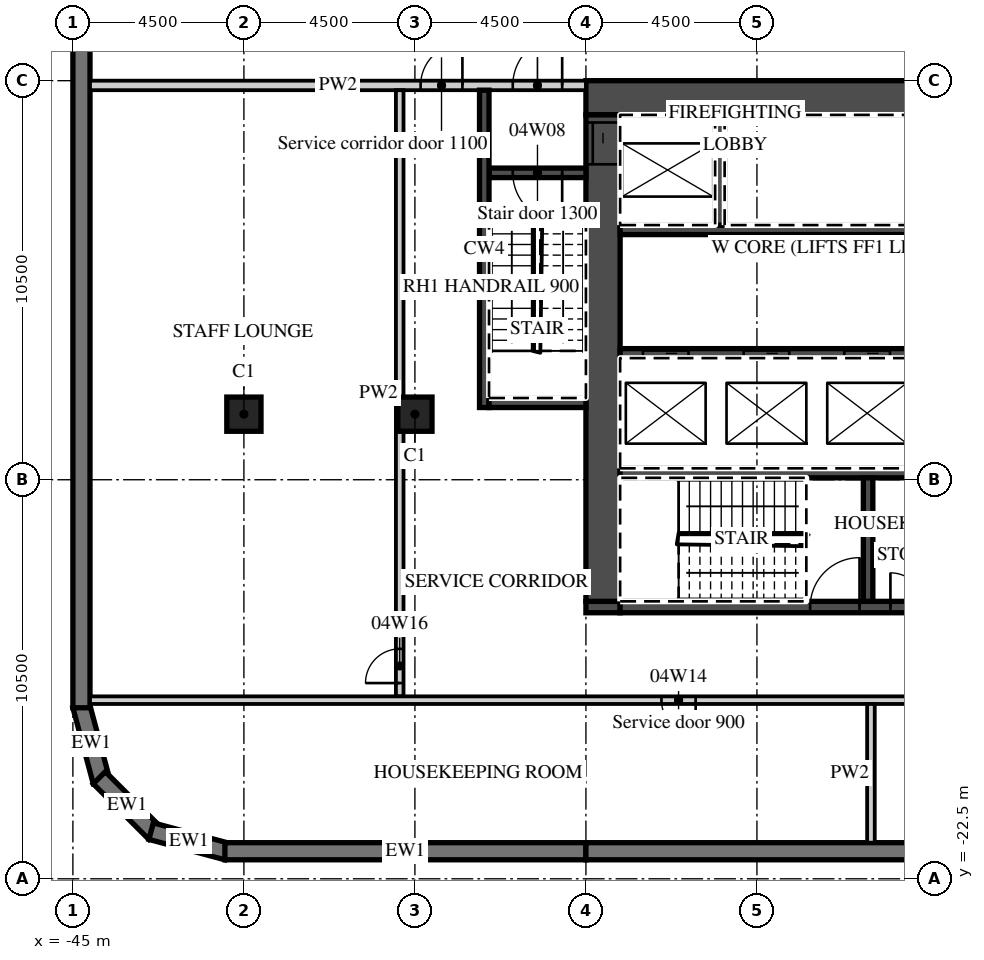
"""IFC4 building model, lengths in metres.
Left out: names, types, materials, properties, quantities, classifications, styles, units other than length and angle.
Written with IfcOpenShell. Run it as: python <this file> out.ifc"""

import sys

from ifc_helpers import new_model, si_unit, direction, frame, frame_2d, origin, origin_2d, place, context, subcontext, project, spatial, polyline, rectangle, outline, extrude, element, fill, save


model = new_model("IFC4")
c1 = context("Model", 3, precision=1e-05, world=origin(), true_north=direction((0.0, 1.0)))
c2 = subcontext(c1, "Body", "Model", "MODEL_VIEW")
j1 = project(units=[si_unit("LENGTHUNIT", "METRE"), si_unit("PLANEANGLEUNIT", "RADIAN")], contexts=[c1])
p1 = place(None, origin())
s1 = spatial("IfcSite", under=j1, at=p1, CompositionType="ELEMENT")
p2 = place(p1, origin())
s2 = spatial("IfcBuilding", under=s1, at=p2, CompositionType="ELEMENT")
p3 = place(p2, frame((0.0, 0.0, 29.0)))
s3 = spatial("IfcBuildingStorey", under=s2, at=p3, CompositionType="ELEMENT", Elevation=29.0)
for number, where, z_axis, x_axis in (
    (1, (-40.5, -10.275, 0.0), (0.0, 0.0, 1.0), (1.0, 0.0, 0.0)),
    (2, (-36.0, -10.275, 0.0), (0.0, 0.0, 1.0), (1.0, 0.0, 0.0)),
):
    element("IfcColumn", number, at=place(p3, frame(where, z_axis=z_axis, x_axis=x_axis)), inside=s3, PredefinedType="COLUMN", context=c2, shape_type="SweptSolid", body=[
        extrude(rectangle(XDim=0.9, YDim=0.9, at=origin_2d()), origin(), (0.0, 0.0, 1.0), 4.5),
    ])
p4 = place(p3, frame((-44.783, -17.942, 0.0), z_axis=(0.0, 0.0, 1.0), x_axis=(0.25881466832, -0.965926999034, 0.0)))
e3 = element("IfcWall", 3, at=p4, inside=s3, PredefinedType="SOLIDWALL", context=c2, shape_type="SweptSolid", body=[
    extrude(outline(polyline([(0.0, -0.225), (2.071, -0.225), (1.95, 0.225), (0.121, 0.225), (0.0, -0.225)])), origin(), (0.0, 0.0, 1.0), 4.05),
])
p5 = place(p3, frame((-44.305, -19.841, 0.0), z_axis=(0.0, 0.0, 1.0), x_axis=(0.707106781187, -0.707106781187, 0.0)))
e4 = element("IfcWall", 4, at=p5, inside=s3, PredefinedType="SOLIDWALL", context=c2, shape_type="SweptSolid", body=[
    extrude(outline(polyline([(0.0, -0.225), (2.071, -0.225), (1.95, 0.225), (0.121, 0.225), (0.0, -0.225)])), origin(), (0.0, 0.0, 1.0), 4.05),
])
p6 = place(p3, frame((-42.942, -21.247, 0.0), z_axis=(0.0, 0.0, 1.0), x_axis=(0.965926999034, -0.25881466832, 0.0)))
e5 = element("IfcWall", 5, at=p6, inside=s3, PredefinedType="SOLIDWALL", context=c2, shape_type="SweptSolid", body=[
    extrude(outline(polyline([(-0.0, -0.225), (2.07, -0.225), (1.95, 0.225), (0.12, 0.225), (-0.0, -0.225)])), origin(), (0.0, 0.0, 1.0), 4.05),
])
p7 = place(p3, frame((-41.0, -21.775, 0.0), z_axis=(0.0, 0.0, 1.0), x_axis=(1.0, 0.0, 0.0)))
e6 = element("IfcWall", 6, at=p7, inside=s3, PredefinedType="SOLIDWALL", context=c2, shape_type="SweptSolid", body=[
    extrude(rectangle(XDim=9.5, YDim=0.45, at=frame_2d((4.75, 0.0))), origin(), (0.0, 0.0, 1.0), 4.05),
])
p8 = place(p3, frame((-31.5, -21.775, 0.0), z_axis=(0.0, 0.0, 1.0), x_axis=(1.0, 0.0, 0.0)))
e7 = element("IfcWall", 7, at=p8, inside=s3, PredefinedType="SOLIDWALL", context=c2, shape_type="SweptSolid", body=[
    extrude(rectangle(XDim=18.0, YDim=0.45, at=frame_2d((9.0, 0.0))), origin(), (0.0, 0.0, 1.0), 4.05),
])
p9 = place(p3, frame((-44.775, 18.0, 0.0), z_axis=(0.0, 0.0, 1.0), x_axis=(0.0, -1.0, 0.0)))
e8 = element("IfcWall", 8, at=p9, inside=s3, PredefinedType="SOLIDWALL", context=c2, shape_type="SweptSolid", body=[
    extrude(rectangle(XDim=36.0, YDim=0.45, at=frame_2d((18.0, 0.0))), origin(), (0.0, 0.0, 1.0), 4.05),
])
p10 = place(p9, frame((4.05, 0.0, 0.9)))
e9 = element("IfcOpeningElement", 9, at=p10, cuts=e8, PredefinedType="OPENING", context=c2, shape_type="SweptSolid", body=[
    extrude(rectangle(XDim=3.0, YDim=1.8, at=frame_2d((1.5, 0.9))), frame((0.0, 0.235, 0.0), z_axis=(0.0, -1.0, 0.0), x_axis=(1.0, 0.0, 0.0)), (0.0, 0.0, 1.0), 0.47),
])
p11 = place(p3, frame((-31.5, -1.95, 0.0), z_axis=(0.0, 0.0, 1.0), x_axis=(1.0, 0.0, 0.0)))
e10 = element("IfcWall", 10, at=p11, inside=s3, PredefinedType="SHEAR", context=c2, shape_type="SweptSolid", body=[
    extrude(rectangle(XDim=18.0, YDim=0.9, at=frame_2d((9.0, 0.0))), origin(), (0.0, 0.0, 1.0), 4.05),
])
p12 = place(p11, frame((14.725, 0.0, 0.0)))
e11 = element("IfcOpeningElement", 11, at=p12, cuts=e10, PredefinedType="OPENING", context=c2, shape_type="SweptSolid", body=[
    extrude(rectangle(XDim=1.8, YDim=2.1, at=frame_2d((0.9, 1.05))), frame((0.0, 0.46, 0.0), z_axis=(0.0, -1.0, 0.0), x_axis=(1.0, 0.0, 0.0)), (0.0, 0.0, 1.0), 0.92),
])
p13 = place(p3, frame((-31.5, -15.35, 0.0), z_axis=(0.0, 0.0, 1.0), x_axis=(1.0, 0.0, 0.0)))
e12 = element("IfcWall", 12, at=p13, inside=s3, PredefinedType="SHEAR", context=c2, shape_type="SweptSolid", body=[
    extrude(rectangle(XDim=0.9, YDim=0.3, at=frame_2d((0.45, 0.0))), origin(), (0.0, 0.0, 1.0), 4.05),
])
p14 = place(p3, frame((-30.6, -15.35, 0.0), z_axis=(0.0, 0.0, 1.0), x_axis=(1.0, 0.0, 0.0)))
e13 = element("IfcWall", 13, at=p14, inside=s3, PredefinedType="SHEAR", context=c2, shape_type="SweptSolid", body=[
    extrude(rectangle(XDim=10.3, YDim=0.3, at=frame_2d((5.15, 0.0))), origin(), (0.0, 0.0, 1.0), 4.05),
])
p15 = place(p14, frame((5.0, 0.0, 0.0)))
e14 = element("IfcOpeningElement", 14, at=p15, cuts=e13, PredefinedType="OPENING", context=c2, shape_type="SweptSolid", body=[
    extrude(rectangle(XDim=1.3, YDim=2.1, at=frame_2d((0.65, 1.05))), frame((0.0, 0.16, 0.0), z_axis=(0.0, -1.0, 0.0), x_axis=(1.0, 0.0, 0.0)), (0.0, 0.0, 1.0), 0.32),
])
p16 = place(p14, frame((7.113, 0.0, 0.0)))
e15 = element("IfcOpeningElement", 15, at=p16, cuts=e13, PredefinedType="OPENING", context=c2, shape_type="SweptSolid", body=[
    extrude(rectangle(XDim=0.9, YDim=2.1, at=frame_2d((0.45, 1.05))), frame((0.0, 0.16, 0.0), z_axis=(0.0, -1.0, 0.0), x_axis=(1.0, 0.0, 0.0)), (0.0, 0.0, 1.0), 0.32),
])
p17 = place(p14, frame((8.938, 0.0, 0.0)))
e16 = element("IfcOpeningElement", 16, at=p17, cuts=e13, PredefinedType="OPENING", context=c2, shape_type="SweptSolid", body=[
    extrude(rectangle(XDim=0.9, YDim=2.1, at=frame_2d((0.45, 1.05))), frame((0.0, 0.16, 0.0), z_axis=(0.0, -1.0, 0.0), x_axis=(1.0, 0.0, 0.0)), (0.0, 0.0, 1.0), 0.32),
])
p18 = place(p3, frame((-31.05, -15.2, 0.0), z_axis=(0.0, 0.0, 1.0), x_axis=(0.0, 1.0, 0.0)))
e17 = element("IfcWall", 17, at=p18, inside=s3, PredefinedType="SHEAR", context=c2, shape_type="SweptSolid", body=[
    extrude(rectangle(XDim=12.8, YDim=0.9, at=frame_2d((6.4, 0.0))), origin(), (0.0, 0.0, 1.0), 4.05),
])
p19 = place(p18, frame((11.5, 0.0, 0.0)))
e18 = element("IfcOpeningElement", 18, at=p19, cuts=e17, PredefinedType="OPENING", context=c2, shape_type="SweptSolid", body=[
    extrude(rectangle(XDim=1.1, YDim=2.1, at=frame_2d((0.55, 1.05))), frame((0.0, 0.46, 0.0), z_axis=(0.0, -1.0, 0.0), x_axis=(1.0, 0.0, 0.0)), (0.0, 0.0, 1.0), 0.92),
])
p20 = place(p3, frame((-30.6, -5.425, 0.0), z_axis=(0.0, 0.0, 1.0), x_axis=(1.0, 0.0, 0.0)))
e19 = element("IfcWall", 19, at=p20, inside=s3, PredefinedType="SHEAR", context=c2, shape_type="SweptSolid", body=[
    extrude(rectangle(XDim=13.0, YDim=0.25, at=frame_2d((6.5, 0.0))), origin(), (0.0, 0.0, 1.0), 4.05),
])
p21 = place(p3, frame((-27.975, -5.3, 0.0), z_axis=(0.0, 0.0, 1.0), x_axis=(0.0, 1.0, 0.0)))
e20 = element("IfcWall", 20, at=p21, inside=s3, PredefinedType="SHEAR", context=c2, shape_type="SweptSolid", body=[
    extrude(rectangle(XDim=2.9, YDim=0.25, at=frame_2d((1.45, 0.0))), origin(), (0.0, 0.0, 1.0), 4.05),
])
p22 = place(p3, frame((-30.6, -8.675, 0.0), z_axis=(0.0, 0.0, 1.0), x_axis=(1.0, 0.0, 0.0)))
e21 = element("IfcWall", 21, at=p22, inside=s3, PredefinedType="SHEAR", context=c2, shape_type="SweptSolid", body=[
    extrude(rectangle(XDim=16.2, YDim=0.25, at=frame_2d((8.1, 0.0))), origin(), (0.0, 0.0, 1.0), 4.05),
])
p23 = place(p22, frame((0.6, 0.0, 0.0)))
e22 = element("IfcOpeningElement", 22, at=p23, cuts=e21, PredefinedType="OPENING", context=c2, shape_type="SweptSolid", body=[
    extrude(rectangle(XDim=1.2, YDim=2.1, at=frame_2d((0.6, 1.05))), frame((0.0, 0.135, 0.0), z_axis=(0.0, -1.0, 0.0), x_axis=(1.0, 0.0, 0.0)), (0.0, 0.0, 1.0), 0.27),
])
p24 = place(p22, frame((3.25, 0.0, 0.0)))
e23 = element("IfcOpeningElement", 23, at=p24, cuts=e21, PredefinedType="OPENING", context=c2, shape_type="SweptSolid", body=[
    extrude(rectangle(XDim=1.2, YDim=2.1, at=frame_2d((0.6, 1.05))), frame((0.0, 0.135, 0.0), z_axis=(0.0, -1.0, 0.0), x_axis=(1.0, 0.0, 0.0)), (0.0, 0.0, 1.0), 0.27),
])
p25 = place(p22, frame((5.9, 0.0, 0.0)))
e24 = element("IfcOpeningElement", 24, at=p25, cuts=e21, PredefinedType="OPENING", context=c2, shape_type="SweptSolid", body=[
    extrude(rectangle(XDim=1.2, YDim=2.1, at=frame_2d((0.6, 1.05))), frame((0.0, 0.135, 0.0), z_axis=(0.0, -1.0, 0.0), x_axis=(1.0, 0.0, 0.0)), (0.0, 0.0, 1.0), 0.27),
])
p26 = place(p22, frame((14.25, 0.0, 0.0)))
e25 = element("IfcOpeningElement", 25, at=p26, cuts=e21, PredefinedType="OPENING", context=c2, shape_type="SweptSolid", body=[
    extrude(rectangle(XDim=1.3, YDim=2.1, at=frame_2d((0.65, 1.05))), frame((0.0, 0.135, 0.0), z_axis=(0.0, -1.0, 0.0), x_axis=(1.0, 0.0, 0.0)), (0.0, 0.0, 1.0), 0.27),
])
p27 = place(p3, frame((-30.6, -11.825, 0.0), z_axis=(0.0, 0.0, 1.0), x_axis=(1.0, 0.0, 0.0)))
e26 = element("IfcWall", 26, at=p27, inside=s3, PredefinedType="SHEAR", context=c2, shape_type="SweptSolid", body=[
    extrude(rectangle(XDim=13.25, YDim=0.25, at=frame_2d((6.625, 0.0))), origin(), (0.0, 0.0, 1.0), 4.05),
])
p28 = place(p3, frame((-24.075, -15.2, 0.0), z_axis=(0.0, 0.0, 1.0), x_axis=(0.0, 1.0, 0.0)))
e27 = element("IfcWall", 27, at=p28, inside=s3, PredefinedType="SHEAR", context=c2, shape_type="SweptSolid", body=[
    extrude(rectangle(XDim=3.25, YDim=0.25, at=frame_2d((1.625, 0.0))), origin(), (0.0, 0.0, 1.0), 4.05),
])
p29 = place(p3, frame((-44.55, -1.625, 0.0), z_axis=(0.0, 0.0, 1.0), x_axis=(1.0, 0.0, 0.0)))
e28 = element("IfcWall", 28, at=p29, inside=s3, PredefinedType="PARTITIONING", context=c2, shape_type="SweptSolid", body=[
    extrude(rectangle(XDim=13.05, YDim=0.25, at=frame_2d((6.525, 0.0))), origin(), (0.0, 0.0, 1.0), 4.05),
])
p30 = place(p29, frame((11.125, 0.0, 0.0)))
e29 = element("IfcOpeningElement", 29, at=p30, cuts=e28, PredefinedType="OPENING", context=c2, shape_type="SweptSolid", body=[
    extrude(rectangle(XDim=1.3, YDim=2.1, at=frame_2d((0.65, 1.05))), frame((0.0, 0.135, 0.0), z_axis=(0.0, -1.0, 0.0), x_axis=(1.0, 0.0, 0.0)), (0.0, 0.0, 1.0), 0.27),
])
p31 = place(p29, frame((8.7, 0.0, 0.0)))
e30 = element("IfcOpeningElement", 30, at=p31, cuts=e28, PredefinedType="OPENING", context=c2, shape_type="SweptSolid", body=[
    extrude(rectangle(XDim=1.1, YDim=2.1, at=frame_2d((0.55, 1.05))), frame((0.0, 0.135, 0.0), z_axis=(0.0, -1.0, 0.0), x_axis=(1.0, 0.0, 0.0)), (0.0, 0.0, 1.0), 0.27),
])
p32 = place(p3, frame((-34.05, -3.925, 0.0), z_axis=(0.0, 0.0, 1.0), x_axis=(1.0, 0.0, 0.0)))
e31 = element("IfcWall", 31, at=p32, inside=s3, PredefinedType="SHEAR", context=c2, shape_type="SweptSolid", body=[
    extrude(rectangle(XDim=2.55, YDim=0.25, at=frame_2d((1.275, 0.0))), origin(), (0.0, 0.0, 1.0), 4.05),
])
p33 = place(p32, frame((0.625, 0.0, 0.0)))
e32 = element("IfcOpeningElement", 32, at=p33, cuts=e31, PredefinedType="OPENING", context=c2, shape_type="SweptSolid", body=[
    extrude(rectangle(XDim=1.3, YDim=2.1, at=frame_2d((0.65, 1.05))), frame((0.0, 0.135, 0.0), z_axis=(0.0, -1.0, 0.0), x_axis=(1.0, 0.0, 0.0)), (0.0, 0.0, 1.0), 0.27),
])
p34 = place(p3, frame((-34.175, -10.1, 0.0), z_axis=(0.0, 0.0, 1.0), x_axis=(0.0, 1.0, 0.0)))
e33 = element("IfcWall", 33, at=p34, inside=s3, PredefinedType="SHEAR", context=c2, shape_type="SweptSolid", body=[
    extrude(rectangle(XDim=8.35, YDim=0.25, at=frame_2d((4.175, 0.0))), origin(), (0.0, 0.0, 1.0), 4.05),
])
p35 = place(p3, frame((-34.05, -9.975, 0.0), z_axis=(0.0, 0.0, 1.0), x_axis=(1.0, 0.0, 0.0)))
e34 = element("IfcWall", 34, at=p35, inside=s3, PredefinedType="SHEAR", context=c2, shape_type="SweptSolid", body=[
    extrude(rectangle(XDim=2.55, YDim=0.25, at=frame_2d((1.275, 0.0))), origin(), (0.0, 0.0, 1.0), 4.05),
])
p36 = place(p3, frame((-36.4, -17.7, 0.0), z_axis=(0.0, 0.0, 1.0), x_axis=(0.0, 1.0, 0.0)))
e35 = element("IfcWall", 35, at=p36, inside=s3, PredefinedType="PARTITIONING", context=c2, shape_type="SweptSolid", body=[
    extrude(rectangle(XDim=15.95, YDim=0.2, at=frame_2d((7.975, 0.0))), origin(), (0.0, 0.0, 1.0), 4.05),
])
p37 = place(p36, frame((0.35, 0.0, 0.0)))
e36 = element("IfcOpeningElement", 36, at=p37, cuts=e35, PredefinedType="OPENING", context=c2, shape_type="SweptSolid", body=[
    extrude(rectangle(XDim=0.9, YDim=2.1, at=frame_2d((0.45, 1.05))), frame((0.0, 0.11, 0.0), z_axis=(0.0, -1.0, 0.0), x_axis=(1.0, 0.0, 0.0)), (0.0, 0.0, 1.0), 0.22),
])
p38 = place(p3, frame((-44.55, -17.8, 0.0), z_axis=(0.0, 0.0, 1.0), x_axis=(1.0, 0.0, 0.0)))
e37 = element("IfcWall", 37, at=p38, inside=s3, PredefinedType="PARTITIONING", context=c2, shape_type="SweptSolid", body=[
    extrude(rectangle(XDim=30.95, YDim=0.2, at=frame_2d((15.475, 0.0))), origin(), (0.0, 0.0, 1.0), 4.05),
])
p39 = place(p38, frame((15.038, 0.0, 0.0)))
e38 = element("IfcOpeningElement", 38, at=p39, cuts=e37, PredefinedType="OPENING", context=c2, shape_type="SweptSolid", body=[
    extrude(rectangle(XDim=0.9, YDim=2.1, at=frame_2d((0.45, 1.05))), frame((0.0, 0.11, 0.0), z_axis=(0.0, -1.0, 0.0), x_axis=(1.0, 0.0, 0.0)), (0.0, 0.0, 1.0), 0.22),
])
p40 = place(p38, frame((23.337, 0.0, 0.0)))
e39 = element("IfcOpeningElement", 39, at=p40, cuts=e37, PredefinedType="OPENING", context=c2, shape_type="SweptSolid", body=[
    extrude(rectangle(XDim=0.9, YDim=2.1, at=frame_2d((0.45, 1.05))), frame((0.0, 0.11, 0.0), z_axis=(0.0, -1.0, 0.0), x_axis=(1.0, 0.0, 0.0)), (0.0, 0.0, 1.0), 0.22),
])
p41 = place(p3, frame((-24.0, -21.55, 0.0), z_axis=(0.0, 0.0, 1.0), x_axis=(0.0, 1.0, 0.0)))
e40 = element("IfcWall", 40, at=p41, inside=s3, PredefinedType="PARTITIONING", context=c2, shape_type="SweptSolid", body=[
    extrude(rectangle(XDim=3.65, YDim=0.2, at=frame_2d((1.825, 0.0))), origin(), (0.0, 0.0, 1.0), 4.05),
])
p42 = place(p23, origin())
e41 = element("IfcDoor", 41, at=p42, inside=s3, OperationType="SLIDING_TO_LEFT", PredefinedType="DOOR", context=c2, shape_type="SweptSolid", body=[
    extrude(rectangle(XDim=1.2, YDim=2.1, at=frame_2d((0.6, 1.05))), frame((0.0, 0.025, 0.0), z_axis=(0.0, -1.0, 0.0), x_axis=(1.0, 0.0, 0.0)), (0.0, 0.0, 1.0), 0.05),
])
fill(e22, e41)
p43 = place(p24, origin())
e42 = element("IfcDoor", 42, at=p43, inside=s3, OperationType="SLIDING_TO_RIGHT", PredefinedType="DOOR", context=c2, shape_type="SweptSolid", body=[
    extrude(rectangle(XDim=1.2, YDim=2.1, at=frame_2d((0.6, 1.05))), frame((0.0, 0.025, 0.0), z_axis=(0.0, -1.0, 0.0), x_axis=(1.0, 0.0, 0.0)), (0.0, 0.0, 1.0), 0.05),
])
fill(e23, e42)
p44 = place(p25, origin())
e43 = element("IfcDoor", 43, at=p44, inside=s3, OperationType="SLIDING_TO_RIGHT", PredefinedType="DOOR", context=c2, shape_type="SweptSolid", body=[
    extrude(rectangle(XDim=1.2, YDim=2.1, at=frame_2d((0.6, 1.05))), frame((0.0, 0.025, 0.0), z_axis=(0.0, -1.0, 0.0), x_axis=(1.0, 0.0, 0.0)), (0.0, 0.0, 1.0), 0.05),
])
fill(e24, e43)
p45 = place(p19, origin())
e44 = element("IfcDoor", 44, at=p45, inside=s3, OperationType="SLIDING_TO_RIGHT", PredefinedType="DOOR", context=c2, shape_type="SweptSolid", body=[
    extrude(rectangle(XDim=1.1, YDim=2.1, at=frame_2d((0.55, 1.05))), frame((0.0, 0.025, 0.0), z_axis=(0.0, -1.0, 0.0), x_axis=(1.0, 0.0, 0.0)), (0.0, 0.0, 1.0), 0.05),
])
fill(e18, e44)
p46 = place(p30, origin())
e45 = element("IfcDoor", 45, at=p46, inside=s3, OperationType="SINGLE_SWING_RIGHT", PredefinedType="DOOR", context=c2, shape_type="SweptSolid", body=[
    extrude(rectangle(XDim=1.3, YDim=2.1, at=frame_2d((0.65, 1.05))), frame((0.0, 0.025, 0.0), z_axis=(0.0, -1.0, 0.0), x_axis=(1.0, 0.0, 0.0)), (0.0, 0.0, 1.0), 0.05),
])
fill(e29, e45)
p47 = place(p33, origin())
e46 = element("IfcDoor", 46, at=p47, inside=s3, OperationType="SINGLE_SWING_RIGHT", PredefinedType="DOOR", context=c2, shape_type="SweptSolid", body=[
    extrude(rectangle(XDim=1.3, YDim=2.1, at=frame_2d((0.65, 1.05))), frame((0.0, 0.025, 0.0), z_axis=(0.0, -1.0, 0.0), x_axis=(1.0, 0.0, 0.0)), (0.0, 0.0, 1.0), 0.05),
])
fill(e32, e46)
p48 = place(p31, origin())
e47 = element("IfcDoor", 47, at=p48, inside=s3, OperationType="SINGLE_SWING_RIGHT", PredefinedType="DOOR", context=c2, shape_type="SweptSolid", body=[
    extrude(rectangle(XDim=1.1, YDim=2.1, at=frame_2d((0.55, 1.05))), frame((0.0, 0.025, 0.0), z_axis=(0.0, -1.0, 0.0), x_axis=(1.0, 0.0, 0.0)), (0.0, 0.0, 1.0), 0.05),
])
fill(e30, e47)
p49 = place(p15, origin())
e48 = element("IfcDoor", 48, at=p49, inside=s3, OperationType="SINGLE_SWING_RIGHT", PredefinedType="DOOR", context=c2, shape_type="SweptSolid", body=[
    extrude(rectangle(XDim=1.3, YDim=2.1, at=frame_2d((0.65, 1.05))), frame((0.0, 0.025, 0.0), z_axis=(0.0, -1.0, 0.0), x_axis=(1.0, 0.0, 0.0)), (0.0, 0.0, 1.0), 0.05),
])
fill(e14, e48)
p50 = place(p16, origin())
e49 = element("IfcDoor", 49, at=p50, inside=s3, OperationType="SINGLE_SWING_LEFT", PredefinedType="DOOR", context=c2, shape_type="SweptSolid", body=[
    extrude(rectangle(XDim=0.9, YDim=2.1, at=frame_2d((0.45, 1.05))), frame((0.0, 0.025, 0.0), z_axis=(0.0, -1.0, 0.0), x_axis=(1.0, 0.0, 0.0)), (0.0, 0.0, 1.0), 0.05),
])
fill(e15, e49)
p51 = place(p39, origin())
e50 = element("IfcDoor", 50, at=p51, inside=s3, OperationType="SINGLE_SWING_RIGHT", PredefinedType="DOOR", context=c2, shape_type="SweptSolid", body=[
    extrude(rectangle(XDim=0.9, YDim=2.1, at=frame_2d((0.45, 1.05))), frame((0.0, 0.025, 0.0), z_axis=(0.0, -1.0, 0.0), x_axis=(1.0, 0.0, 0.0)), (0.0, 0.0, 1.0), 0.05),
])
fill(e38, e50)
p52 = place(p37, origin())
e51 = element("IfcDoor", 51, at=p52, inside=s3, OperationType="SINGLE_SWING_LEFT", PredefinedType="DOOR", context=c2, shape_type="SweptSolid", body=[
    extrude(rectangle(XDim=0.9, YDim=2.1, at=frame_2d((0.45, 1.05))), frame((0.0, 0.025, 0.0), z_axis=(0.0, -1.0, 0.0), x_axis=(1.0, 0.0, 0.0)), (0.0, 0.0, 1.0), 0.05),
])
fill(e36, e51)
save(model, sys.argv[1])
